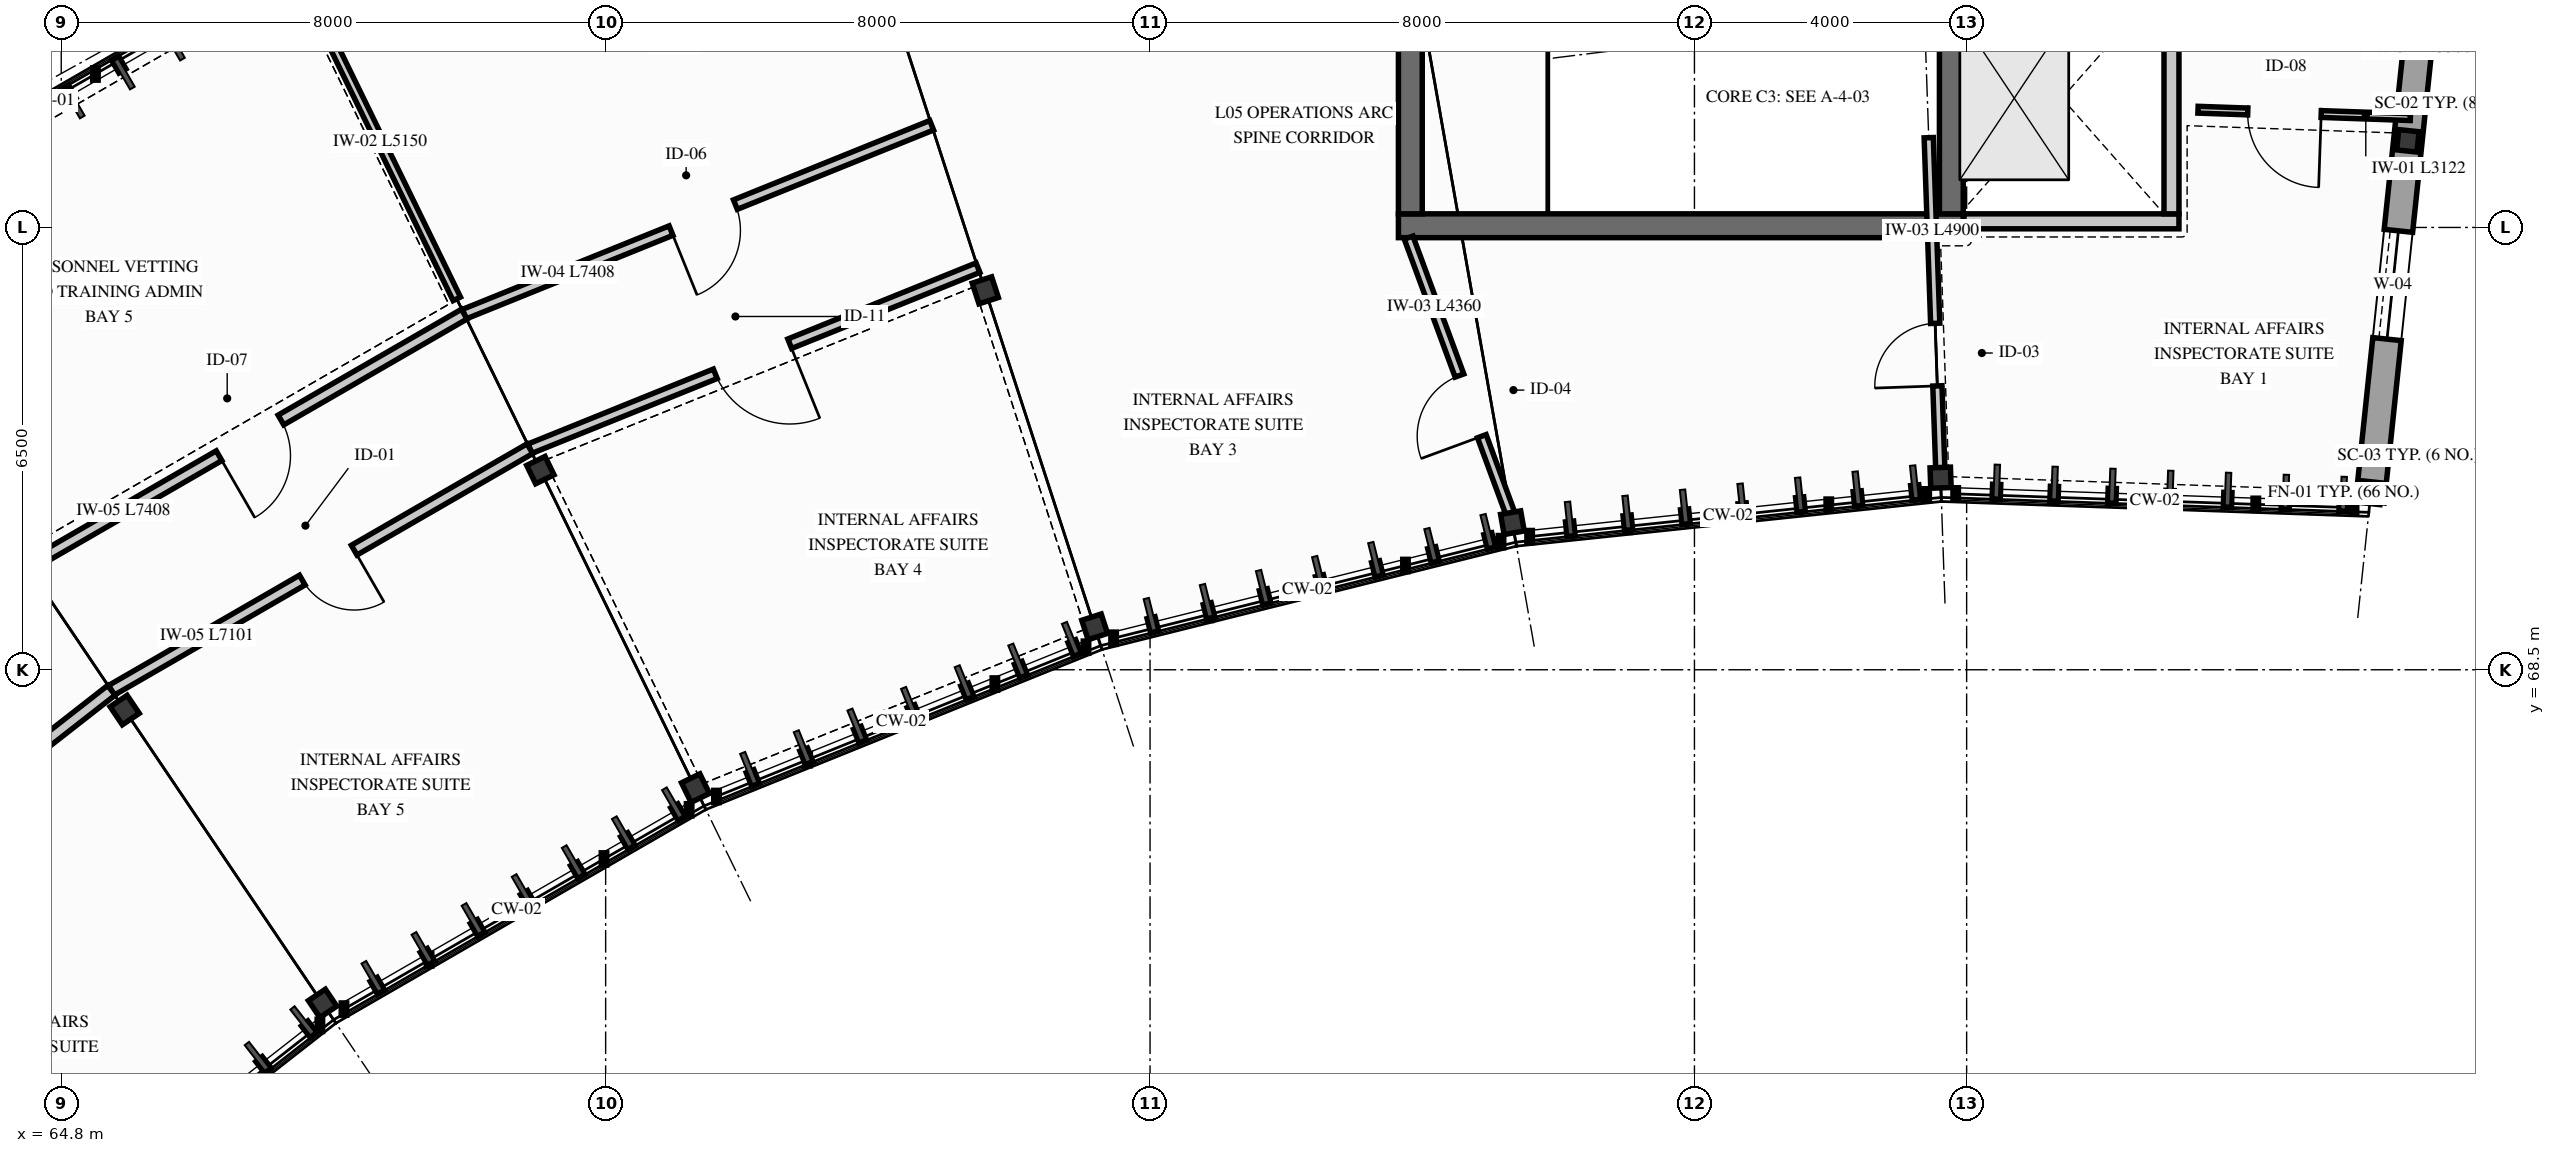
"""IFC4 building model, lengths in metres.
Left out: names, types, materials, properties, quantities, classifications, styles, units other than length and angle.
Written with IfcOpenShell. Run it as: python <this file> out.ifc"""

import sys

from ifc_helpers import new_model, si_unit, direction, frame, frame_2d, origin, origin_2d, place, context, subcontext, project, spatial, rectangle, i_section, extrude, element, fill, save


model = new_model("IFC4")
c1 = context("Model", 3, precision=1e-05, world=origin(), true_north=direction((0.0, 1.0)))
c2 = subcontext(c1, "Body", "Model", "MODEL_VIEW")
j1 = project(units=[si_unit("LENGTHUNIT", "METRE"), si_unit("PLANEANGLEUNIT", "RADIAN")], contexts=[c1])
p1 = place(None, origin())
s1 = spatial("IfcSite", under=j1, at=p1, CompositionType="ELEMENT")
p2 = place(p1, origin())
s2 = spatial("IfcBuilding", under=s1, at=p2, CompositionType="ELEMENT")
p3 = place(p2, frame((0.0, 0.0, 21.6)))
s3 = spatial("IfcBuildingStorey", under=s2, at=p3, CompositionType="ELEMENT", Elevation=21.6)
p4 = place(p3, frame((84.45, 75.025, 0.0), z_axis=(0.0, 0.0, 1.0), x_axis=(1.0, 0.0, 0.0)))
e1 = element("IfcWall", 1, at=p4, inside=s3, PredefinedType="SHEAR", context=c2, shape_type="SweptSolid", body=[
    extrude(rectangle(XDim=8.3, YDim=0.35, at=frame_2d((4.15, 0.0))), origin(), (0.0, 0.0, 1.0), 3.66),
])
p5 = place(p3, frame((84.625, 75.2, 0.0), z_axis=(0.0, 0.0, 1.0), x_axis=(0.0, 1.0, 0.0)))
e2 = element("IfcWall", 2, at=p5, inside=s3, PredefinedType="SHEAR", context=c2, shape_type="SweptSolid", body=[
    extrude(rectangle(XDim=6.8, YDim=0.35, at=frame_2d((3.4, 0.0))), origin(), (0.0, 0.0, 1.0), 3.66),
])
p6 = place(p5, frame((2.6, 0.0, 0.0)))
e3 = element("IfcOpeningElement", 3, at=p6, cuts=e2, PredefinedType="OPENING", context=c2, shape_type="SweptSolid", body=[
    extrude(rectangle(XDim=1.25, YDim=2.2, at=frame_2d((0.625, 1.1))), frame((0.0, 0.185, 0.0), z_axis=(0.0, -1.0, 0.0), x_axis=(1.0, 0.0, 0.0)), (0.0, 0.0, 1.0), 0.37),
])
p7 = place(p3, frame((92.575, 75.2, 0.0), z_axis=(0.0, 0.0, 1.0), x_axis=(0.0, 1.0, 0.0)))
e4 = element("IfcWall", 4, at=p7, inside=s3, PredefinedType="SHEAR", context=c2, shape_type="SweptSolid", body=[
    extrude(rectangle(XDim=6.8, YDim=0.35, at=frame_2d((3.4, 0.0))), origin(), (0.0, 0.0, 1.0), 3.66),
])
p8 = place(p3, frame((98.74, 71.102, 0.0), z_axis=(0.0, 0.0, 1.0), x_axis=(0.994521895368, -0.104528463268, 0.0)))
e5 = element("IfcColumn", 5, at=p8, inside=s3, PredefinedType="COLUMN", context=c2, shape_type="SweptSolid", body=[
    extrude(i_section(OverallWidth=0.3, OverallDepth=0.32, WebThickness=0.011, FlangeThickness=0.021, FilletRadius=0.027, at=origin_2d()), origin(), (0.0, 0.0, 1.0), 3.454),
])
p9 = place(p3, frame((99.284, 76.273, 0.0), z_axis=(0.0, 0.0, 1.0), x_axis=(0.994521895368, -0.104528463268, 0.0)))
e6 = element("IfcColumn", 6, at=p9, inside=s3, PredefinedType="COLUMN", context=c2, shape_type="SweptSolid", body=[
    extrude(i_section(OverallWidth=0.3, OverallDepth=0.3, WebThickness=0.011, FlangeThickness=0.019, FilletRadius=0.027, at=origin_2d()), origin(), (0.0, 0.0, 1.0), 4.256),
])
p10 = place(p3, frame((92.417, 71.323, 0.0), z_axis=(0.0, 0.0, 1.0), x_axis=(0.999390827019, 0.034899496703, 0.0)))
e7 = element("IfcColumn", 7, at=p10, inside=s3, PredefinedType="COLUMN", context=c2, shape_type="SweptSolid", body=[
    extrude(i_section(OverallWidth=0.3, OverallDepth=0.3, WebThickness=0.011, FlangeThickness=0.019, FilletRadius=0.027, at=origin_2d()), origin(), (0.0, 0.0, 1.0), 3.754),
])
p11 = place(p3, frame((86.125, 70.661, 0.0), z_axis=(0.0, 0.0, 1.0), x_axis=(0.984807753012, 0.173648177667, 0.0)))
e8 = element("IfcColumn", 8, at=p11, inside=s3, PredefinedType="COLUMN", context=c2, shape_type="SweptSolid", body=[
    extrude(i_section(OverallWidth=0.3, OverallDepth=0.3, WebThickness=0.011, FlangeThickness=0.019, FilletRadius=0.027, at=origin_2d()), origin(), (0.0, 0.0, 1.0), 4.054),
])
p12 = place(p3, frame((79.986, 69.13, 0.0), z_axis=(0.0, 0.0, 1.0), x_axis=(0.951056516295, 0.309016994375, 0.0)))
e9 = element("IfcColumn", 9, at=p12, inside=s3, PredefinedType="COLUMN", context=c2, shape_type="SweptSolid", body=[
    extrude(i_section(OverallWidth=0.3, OverallDepth=0.3, WebThickness=0.011, FlangeThickness=0.019, FilletRadius=0.027, at=origin_2d()), origin(), (0.0, 0.0, 1.0), 4.354),
])
p13 = place(p3, frame((78.379, 74.076, 0.0), z_axis=(0.0, 0.0, 1.0), x_axis=(0.951056516295, 0.309016994375, 0.0)))
e10 = element("IfcColumn", 10, at=p13, inside=s3, PredefinedType="COLUMN", context=c2, shape_type="SweptSolid", body=[
    extrude(i_section(OverallWidth=0.3, OverallDepth=0.32, WebThickness=0.011, FlangeThickness=0.021, FilletRadius=0.027, at=origin_2d()), origin(), (0.0, 0.0, 1.0), 5.156),
])
p14 = place(p3, frame((74.12, 66.76, 0.0), z_axis=(0.0, 0.0, 1.0), x_axis=(0.898794046299, 0.438371146789, 0.0)))
e11 = element("IfcColumn", 11, at=p14, inside=s3, PredefinedType="COLUMN", context=c2, shape_type="SweptSolid", body=[
    extrude(i_section(OverallWidth=0.3, OverallDepth=0.32, WebThickness=0.011, FlangeThickness=0.021, FilletRadius=0.027, at=origin_2d()), origin(), (0.0, 0.0, 1.0), 3.9),
])
for number, where, z_axis, x_axis in (
    (12, (71.84, 71.434, 0.0), (0.0, 0.0, 1.0), (0.899, 0.438, 0.0)),
    (13, (68.641, 63.597, 0.0), (0.0, 0.0, 1.0), (0.829, 0.559, 0.0)),
):
    element("IfcColumn", number, at=place(p3, frame(where, z_axis=z_axis, x_axis=x_axis)), inside=s3, PredefinedType="COLUMN", context=c2, shape_type="SweptSolid", body=[
        extrude(i_section(OverallWidth=0.3, OverallDepth=0.3, WebThickness=0.011, FlangeThickness=0.019, FilletRadius=0.027, at=origin_2d()), origin(), (0.0, 0.0, 1.0), 3.9),
    ])
p15 = place(p3, frame((65.733, 67.908, 0.0), z_axis=(0.0, 0.0, 1.0), x_axis=(0.829037572555, 0.559192903471, 0.0)))
e14 = element("IfcColumn", 14, at=p15, inside=s3, PredefinedType="COLUMN", context=c2, shape_type="SweptSolid", body=[
    extrude(i_section(OverallWidth=0.3, OverallDepth=0.32, WebThickness=0.011, FlangeThickness=0.021, FilletRadius=0.027, at=origin_2d()), origin(), (0.0, 0.0, 1.0), 3.9),
])
p16 = place(p3, frame((98.727, 70.972, 0.0), z_axis=(0.0, 0.0, 1.0), x_axis=(0.104534827036, 0.994521226489, 0.0)))
e15 = element("IfcWall", 15, at=p16, inside=s3, PredefinedType="SOLIDWALL", context=c2, shape_type="SweptSolid", body=[
    extrude(rectangle(XDim=13.56, YDim=0.42, at=frame_2d((6.78, 0.0))), origin(), (0.0, 0.0, 1.0), 3.35),
])
p17 = place(p16, frame((2.4, 0.0, 0.74)))
e16 = element("IfcOpeningElement", 16, at=p17, cuts=e15, PredefinedType="OPENING", context=c2, shape_type="SweptSolid", body=[
    extrude(rectangle(XDim=1.6, YDim=2.4, at=frame_2d((0.8, 1.2))), frame((0.0, 0.22, 0.0), z_axis=(0.0, -1.0, 0.0), x_axis=(1.0, 0.0, 0.0)), (0.0, 0.0, 1.0), 0.44),
])
p18 = place(p16, frame((9.4, 0.0, 0.74)))
e17 = element("IfcOpeningElement", 17, at=p18, cuts=e15, PredefinedType="OPENING", context=c2, shape_type="SweptSolid", body=[
    extrude(rectangle(XDim=1.6, YDim=2.4, at=frame_2d((0.8, 1.2))), frame((0.0, 0.22, 0.0), z_axis=(0.0, -1.0, 0.0), x_axis=(1.0, 0.0, 0.0)), (0.0, 0.0, 1.0), 0.44),
])
p19 = place(p3, frame((92.76, 75.09, 0.0), z_axis=(0.0, 0.0, 1.0), x_axis=(1.0, 0.0, 0.0)))
e18 = element("IfcWall", 18, at=p19, inside=s3, PredefinedType="PARTITIONING", context=c2, shape_type="SweptSolid", body=[
    extrude(rectangle(XDim=3.16, YDim=0.22, at=frame_2d((1.58, 0.0))), origin(), (0.0, 0.0, 1.0), 3.62),
])
p20 = place(p3, frame((95.81, 75.2, 0.0), z_axis=(0.0, 0.0, 1.0), x_axis=(0.0, 1.0, 0.0)))
e19 = element("IfcWall", 19, at=p20, inside=s3, PredefinedType="PARTITIONING", context=c2, shape_type="SweptSolid", body=[
    extrude(rectangle(XDim=3.4, YDim=0.22, at=frame_2d((1.7, 0.0))), origin(), (0.0, 0.0, 1.0), 3.62),
])
p21 = place(p3, frame((92.414, 71.422, 0.0), z_axis=(0.0, 0.0, 1.0), x_axis=(-0.034877560821, 0.999391592796, 0.0)))
e20 = element("IfcWall", 20, at=p21, inside=s3, PredefinedType="PARTITIONING", context=c2, shape_type="SweptSolid", body=[
    extrude(rectangle(XDim=4.9, YDim=0.135, at=frame_2d((2.45, 0.0))), origin(), (0.0, 0.0, 1.0), 3.62),
])
p22 = place(p21, frame((1.25, 0.0, 0.0)))
e21 = element("IfcOpeningElement", 21, at=p22, cuts=e20, PredefinedType="OPENING", context=c2, shape_type="SweptSolid", body=[
    extrude(rectangle(XDim=0.92, YDim=2.12, at=frame_2d((0.46, 1.06))), frame((0.0, 0.077, 0.0), z_axis=(0.0, -1.0, 0.0), x_axis=(1.0, 0.0, 0.0)), (0.0, 0.0, 1.0), 0.155),
])
p23 = place(p3, frame((86.108, 70.76, 0.0), z_axis=(0.0, 0.0, 1.0), x_axis=(-0.345809164341, 0.938304866159, 0.0)))
e22 = element("IfcWall", 22, at=p23, inside=s3, PredefinedType="PARTITIONING", context=c2, shape_type="SweptSolid", body=[
    extrude(rectangle(XDim=4.36, YDim=0.135, at=frame_2d((2.18, 0.0))), origin(), (0.0, 0.0, 1.0), 3.62),
])
p24 = place(p23, frame((1.25, 0.0, 0.0)))
e23 = element("IfcOpeningElement", 23, at=p24, cuts=e22, PredefinedType="OPENING", context=c2, shape_type="SweptSolid", body=[
    extrude(rectangle(XDim=0.95, YDim=2.15, at=frame_2d((0.475, 1.075))), frame((0.0, 0.077, 0.0), z_axis=(0.0, -1.0, 0.0), x_axis=(1.0, 0.0, 0.0)), (0.0, 0.0, 1.0), 0.155),
])
p25 = place(p3, frame((99.321, 76.621, 0.0), z_axis=(0.0, 0.0, 1.0), x_axis=(-0.999389073029, 0.034949688284, 0.0)))
e24 = element("IfcWall", 24, at=p25, inside=s3, PredefinedType="PARTITIONING", context=c2, shape_type="SweptSolid", body=[
    extrude(rectangle(XDim=3.123, YDim=0.1, at=frame_2d((1.561, 0.0))), origin(), (0.0, 0.0, 1.0), 3.62),
])
p26 = place(p25, frame((1.311, 0.0, 0.0)))
e25 = element("IfcOpeningElement", 25, at=p26, cuts=e24, PredefinedType="OPENING", context=c2, shape_type="SweptSolid", body=[
    extrude(rectangle(XDim=1.08, YDim=2.22, at=frame_2d((0.54, 1.11))), frame((0.0, 0.06, 0.0), z_axis=(0.0, -1.0, 0.0), x_axis=(1.0, 0.0, 0.0)), (0.0, 0.0, 1.0), 0.12),
])
p27 = place(p3, frame((78.271, 74.409, 0.0), z_axis=(0.0, 0.0, 1.0), x_axis=(-0.927181218568, -0.374613117677, 0.0)))
e26 = element("IfcWall", 26, at=p27, inside=s3, PredefinedType="PARTITIONING", context=c2, shape_type="SweptSolid", body=[
    extrude(rectangle(XDim=7.101, YDim=0.15, at=frame_2d((3.551, 0.0))), origin(), (0.0, 0.0, 1.0), 3.62),
])
p28 = place(p27, frame((2.983, 0.0, 0.0)))
e27 = element("IfcOpeningElement", 27, at=p28, cuts=e26, PredefinedType="OPENING", context=c2, shape_type="SweptSolid", body=[
    extrude(rectangle(XDim=1.18, YDim=2.24, at=frame_2d((0.59, 1.12))), frame((0.0, 0.085, 0.0), z_axis=(0.0, -1.0, 0.0), x_axis=(1.0, 0.0, 0.0)), (0.0, 0.0, 1.0), 0.17),
])
p29 = place(p3, frame((77.591, 76.501, 0.0), z_axis=(0.0, 0.0, 1.0), x_axis=(-0.927187035022, -0.374598721418, 0.0)))
e28 = element("IfcWall", 28, at=p29, inside=s3, PredefinedType="PARTITIONING", context=c2, shape_type="SweptSolid", body=[
    extrude(rectangle(XDim=7.408, YDim=0.15, at=frame_2d((3.704, 0.0))), origin(), (0.0, 0.0, 1.0), 3.62),
])
p30 = place(p29, frame((3.111, 0.0, 0.0)))
e29 = element("IfcOpeningElement", 29, at=p30, cuts=e28, PredefinedType="OPENING", context=c2, shape_type="SweptSolid", body=[
    extrude(rectangle(XDim=1.02, YDim=2.18, at=frame_2d((0.51, 1.09))), frame((0.0, 0.085, 0.0), z_axis=(0.0, -1.0, 0.0), x_axis=(1.0, 0.0, 0.0)), (0.0, 0.0, 1.0), 0.17),
])
p31 = place(p3, frame((70.613, 73.951, 0.0), z_axis=(0.0, 0.0, 1.0), x_axis=(-0.438355450259, 0.898801701839, 0.0)))
e30 = element("IfcWall", 30, at=p31, inside=s3, PredefinedType="PARTITIONING", context=c2, shape_type="SweptSolid", body=[
    extrude(rectangle(XDim=5.15, YDim=0.12, at=frame_2d((2.575, 0.0))), origin(), (0.0, 0.0, 1.0), 3.19),
])
p32 = place(p3, frame((71.687, 71.749, 0.0), z_axis=(0.0, 0.0, 1.0), x_axis=(-0.866032151687, -0.499988312107, 0.0)))
e31 = element("IfcWall", 31, at=p32, inside=s3, PredefinedType="PARTITIONING", context=c2, shape_type="SweptSolid", body=[
    extrude(rectangle(XDim=7.101, YDim=0.165, at=frame_2d((3.551, 0.0))), origin(), (0.0, 0.0, 1.0), 3.62),
])
p33 = place(p32, frame((2.982, 0.0, 0.0)))
e32 = element("IfcOpeningElement", 32, at=p33, cuts=e31, PredefinedType="OPENING", context=c2, shape_type="SweptSolid", body=[
    extrude(rectangle(XDim=0.88, YDim=2.1, at=frame_2d((0.44, 1.05))), frame((0.0, 0.093, 0.0), z_axis=(0.0, -1.0, 0.0), x_axis=(1.0, 0.0, 0.0)), (0.0, 0.0, 1.0), 0.185),
])
p34 = place(p3, frame((70.722, 73.726, 0.0), z_axis=(0.0, 0.0, 1.0), x_axis=(-0.866019843608, -0.500009630384, 0.0)))
e33 = element("IfcWall", 33, at=p34, inside=s3, PredefinedType="PARTITIONING", context=c2, shape_type="SweptSolid", body=[
    extrude(rectangle(XDim=7.408, YDim=0.165, at=frame_2d((3.704, 0.0))), origin(), (0.0, 0.0, 1.0), 3.62),
])
p35 = place(p34, frame((3.111, 0.0, 0.0)))
e34 = element("IfcOpeningElement", 34, at=p35, cuts=e33, PredefinedType="OPENING", context=c2, shape_type="SweptSolid", body=[
    extrude(rectangle(XDim=1.05, YDim=2.2, at=frame_2d((0.525, 1.1))), frame((0.0, 0.093, 0.0), z_axis=(0.0, -1.0, 0.0), x_axis=(1.0, 0.0, 0.0)), (0.0, 0.0, 1.0), 0.185),
])
p36 = place(p3, frame((65.537, 68.198, 0.0), z_axis=(0.0, 0.0, 1.0), x_axis=(-0.788011863809, -0.615660054329, 0.0)))
e35 = element("IfcWall", 35, at=p36, inside=s3, PredefinedType="PARTITIONING", context=c2, shape_type="SweptSolid", body=[
    extrude(rectangle(XDim=7.101, YDim=0.18, at=frame_2d((3.551, 0.0))), origin(), (0.0, 0.0, 1.0), 3.62),
])
p37 = place(p36, frame((2.982, 0.0, 0.0)))
e36 = element("IfcOpeningElement", 36, at=p37, cuts=e35, PredefinedType="OPENING", context=c2, shape_type="SweptSolid", body=[
    extrude(rectangle(XDim=0.9, YDim=2.1, at=frame_2d((0.45, 1.05))), frame((0.0, 0.1, 0.0), z_axis=(0.0, -1.0, 0.0), x_axis=(1.0, 0.0, 0.0)), (0.0, 0.0, 1.0), 0.2),
])
p38 = place(p17, origin())
e37 = element("IfcWindow", 37, at=p38, inside=s3, PartitioningType="SINGLE_PANEL", PredefinedType="WINDOW", context=c2, shape_type="SweptSolid", body=[
    extrude(rectangle(XDim=1.6, YDim=2.4, at=frame_2d((0.8, 1.2))), frame((0.0, 0.03, 0.0), z_axis=(0.0, -1.0, 0.0), x_axis=(1.0, 0.0, 0.0)), (0.0, 0.0, 1.0), 0.06),
])
fill(e16, e37)
p39 = place(p22, origin())
e38 = element("IfcDoor", 38, at=p39, inside=s3, OperationType="SINGLE_SWING_LEFT", PredefinedType="DOOR", context=c2, shape_type="SweptSolid", body=[
    extrude(rectangle(XDim=0.92, YDim=2.12, at=frame_2d((0.46, 1.06))), frame((0.0, 0.025, 0.0), z_axis=(0.0, -1.0, 0.0), x_axis=(1.0, 0.0, 0.0)), (0.0, 0.0, 1.0), 0.05),
])
fill(e21, e38)
p40 = place(p24, origin())
e39 = element("IfcDoor", 39, at=p40, inside=s3, OperationType="SINGLE_SWING_LEFT", PredefinedType="DOOR", context=c2, shape_type="SweptSolid", body=[
    extrude(rectangle(XDim=0.95, YDim=2.15, at=frame_2d((0.475, 1.075))), frame((0.0, 0.025, 0.0), z_axis=(0.0, -1.0, 0.0), x_axis=(1.0, 0.0, 0.0)), (0.0, 0.0, 1.0), 0.05),
])
fill(e23, e39)
p41 = place(p26, origin())
e40 = element("IfcDoor", 40, at=p41, inside=s3, OperationType="SINGLE_SWING_LEFT", PredefinedType="DOOR", context=c2, shape_type="SweptSolid", body=[
    extrude(rectangle(XDim=1.08, YDim=2.22, at=frame_2d((0.54, 1.11))), frame((0.0, 0.025, 0.0), z_axis=(0.0, -1.0, 0.0), x_axis=(1.0, 0.0, 0.0)), (0.0, 0.0, 1.0), 0.05),
])
fill(e25, e40)
p42 = place(p28, origin())
e41 = element("IfcDoor", 41, at=p42, inside=s3, OperationType="SINGLE_SWING_LEFT", PredefinedType="DOOR", context=c2, shape_type="SweptSolid", body=[
    extrude(rectangle(XDim=1.18, YDim=2.24, at=frame_2d((0.59, 1.12))), frame((0.0, 0.025, 0.0), z_axis=(0.0, -1.0, 0.0), x_axis=(1.0, 0.0, 0.0)), (0.0, 0.0, 1.0), 0.05),
])
fill(e27, e41)
p43 = place(p30, origin())
e42 = element("IfcDoor", 42, at=p43, inside=s3, OperationType="SINGLE_SWING_RIGHT", PredefinedType="DOOR", context=c2, shape_type="SweptSolid", body=[
    extrude(rectangle(XDim=1.02, YDim=2.18, at=frame_2d((0.51, 1.09))), frame((0.0, 0.025, 0.0), z_axis=(0.0, -1.0, 0.0), x_axis=(1.0, 0.0, 0.0)), (0.0, 0.0, 1.0), 0.05),
])
fill(e29, e42)
p44 = place(p33, origin())
e43 = element("IfcDoor", 43, at=p44, inside=s3, OperationType="SINGLE_SWING_LEFT", PredefinedType="DOOR", context=c2, shape_type="SweptSolid", body=[
    extrude(rectangle(XDim=0.88, YDim=2.1, at=frame_2d((0.44, 1.05))), frame((0.0, 0.025, 0.0), z_axis=(0.0, -1.0, 0.0), x_axis=(1.0, 0.0, 0.0)), (0.0, 0.0, 1.0), 0.05),
])
fill(e32, e43)
p45 = place(p35, origin())
e44 = element("IfcDoor", 44, at=p45, inside=s3, OperationType="SINGLE_SWING_RIGHT", PredefinedType="DOOR", context=c2, shape_type="SweptSolid", body=[
    extrude(rectangle(XDim=1.05, YDim=2.2, at=frame_2d((0.525, 1.1))), frame((0.0, 0.025, 0.0), z_axis=(0.0, -1.0, 0.0), x_axis=(1.0, 0.0, 0.0)), (0.0, 0.0, 1.0), 0.05),
])
fill(e34, e44)
save(model, sys.argv[1])
